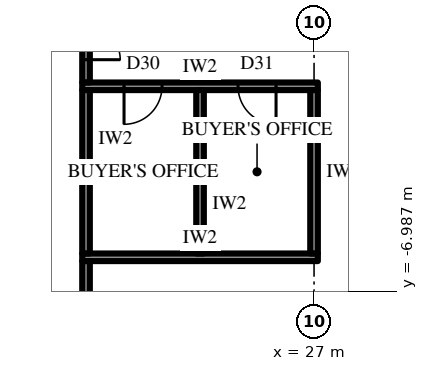
"""IFC4 building model, lengths in metres.
Left out: names, types, materials, properties, quantities, classifications, styles, units other than length and angle.
Written with IfcOpenShell. Run it as: python <this file> out.ifc"""

import sys

from ifc_helpers import new_model, si_unit, direction, frame, frame_2d, origin, place, context, subcontext, project, spatial, rectangle, extrude, element, fill, save


model = new_model("IFC4")
c1 = context("Model", 3, precision=1e-05, world=origin(), true_north=direction((0.0, 1.0)))
c2 = subcontext(c1, "Body", "Model", "MODEL_VIEW")
j1 = project(units=[si_unit("LENGTHUNIT", "METRE"), si_unit("PLANEANGLEUNIT", "RADIAN")], contexts=[c1])
p1 = place(None, origin())
s1 = spatial("IfcSite", under=j1, at=p1, CompositionType="ELEMENT")
p2 = place(p1, origin())
s2 = spatial("IfcBuilding", under=s1, at=p2, CompositionType="ELEMENT")
p3 = place(p2, frame((0.0, 0.0, 73.9)))
s3 = spatial("IfcBuildingStorey", under=s2, at=p3, CompositionType="ELEMENT", Elevation=73.9)
p4 = place(p3, frame((21.232, -30.925, 0.0), z_axis=(0.0, 0.0, 1.0), x_axis=(0.499999163675, 0.866025886636, 0.0)))
e1 = element("IfcWall", 1, at=p4, inside=s3, PredefinedType="SOLIDWALL", context=c2, shape_type="SweptSolid", body=[
    extrude(rectangle(XDim=32.332, YDim=0.3, at=frame_2d((16.166, 0.0))), origin(), (0.0, 0.0, 1.0), 2.7),
])
p5 = place(p4, frame((1.319, 0.0, 0.6)))
e2 = element("IfcOpeningElement", 2, at=p5, cuts=e1, PredefinedType="OPENING", context=c2, shape_type="SweptSolid", body=[
    extrude(rectangle(XDim=2.75, YDim=1.85, at=frame_2d((1.375, 0.925))), frame((0.0, 0.16, 0.0), z_axis=(0.0, -1.0, 0.0), x_axis=(1.0, 0.0, 0.0)), (0.0, 0.0, 1.0), 0.32),
])
p6 = place(p4, frame((6.708, 0.0, 0.6)))
e3 = element("IfcOpeningElement", 3, at=p6, cuts=e1, PredefinedType="OPENING", context=c2, shape_type="SweptSolid", body=[
    extrude(rectangle(XDim=2.75, YDim=1.85, at=frame_2d((1.375, 0.925))), frame((0.0, 0.16, 0.0), z_axis=(0.0, -1.0, 0.0), x_axis=(1.0, 0.0, 0.0)), (0.0, 0.0, 1.0), 0.32),
])
p7 = place(p4, frame((12.872, 0.0, 0.0)))
e4 = element("IfcOpeningElement", 4, at=p7, cuts=e1, PredefinedType="OPENING", context=c2, shape_type="SweptSolid", body=[
    extrude(rectangle(XDim=1.2, YDim=2.4, at=frame_2d((0.6, 1.2))), frame((0.0, 0.16, 0.0), z_axis=(0.0, -1.0, 0.0), x_axis=(1.0, 0.0, 0.0)), (0.0, 0.0, 1.0), 0.32),
])
p8 = place(p4, frame((17.485, 0.0, 0.6)))
e5 = element("IfcOpeningElement", 5, at=p8, cuts=e1, PredefinedType="OPENING", context=c2, shape_type="SweptSolid", body=[
    extrude(rectangle(XDim=2.75, YDim=1.85, at=frame_2d((1.375, 0.925))), frame((0.0, 0.16, 0.0), z_axis=(0.0, -1.0, 0.0), x_axis=(1.0, 0.0, 0.0)), (0.0, 0.0, 1.0), 0.32),
])
p9 = place(p4, frame((22.874, 0.0, 0.6)))
e6 = element("IfcOpeningElement", 6, at=p9, cuts=e1, PredefinedType="OPENING", context=c2, shape_type="SweptSolid", body=[
    extrude(rectangle(XDim=2.75, YDim=1.85, at=frame_2d((1.375, 0.925))), frame((0.0, 0.16, 0.0), z_axis=(0.0, -1.0, 0.0), x_axis=(1.0, 0.0, 0.0)), (0.0, 0.0, 1.0), 0.32),
])
p10 = place(p4, frame((28.262, 0.0, 0.6)))
e7 = element("IfcOpeningElement", 7, at=p10, cuts=e1, PredefinedType="OPENING", context=c2, shape_type="SweptSolid", body=[
    extrude(rectangle(XDim=2.75, YDim=1.85, at=frame_2d((1.375, 0.925))), frame((0.0, 0.16, 0.0), z_axis=(0.0, -1.0, 0.0), x_axis=(1.0, 0.0, 0.0)), (0.0, 0.0, 1.0), 0.32),
])
p11 = place(p3, frame((20.9, -1.6, 0.0), z_axis=(0.0, 0.0, 1.0), x_axis=(1.0, 0.0, 0.0)))
e8 = element("IfcWall", 8, at=p11, inside=s3, PredefinedType="PARTITIONING", context=c2, shape_type="SweptSolid", body=[
    extrude(rectangle(XDim=6.2, YDim=0.2, at=frame_2d((3.1, 0.0))), origin(), (0.0, 0.0, 1.0), 4.0),
])
p12 = place(p11, frame((1.1, 0.0, 0.0)))
e9 = element("IfcOpeningElement", 9, at=p12, cuts=e8, PredefinedType="OPENING", context=c2, shape_type="SweptSolid", body=[
    extrude(rectangle(XDim=1.0, YDim=2.2, at=frame_2d((0.5, 1.1))), frame((0.0, 0.11, 0.0), z_axis=(0.0, -1.0, 0.0), x_axis=(1.0, 0.0, 0.0)), (0.0, 0.0, 1.0), 0.22),
])
p13 = place(p11, frame((4.1, 0.0, 0.0)))
e10 = element("IfcOpeningElement", 10, at=p13, cuts=e8, PredefinedType="OPENING", context=c2, shape_type="SweptSolid", body=[
    extrude(rectangle(XDim=1.0, YDim=2.2, at=frame_2d((0.5, 1.1))), frame((0.0, 0.11, 0.0), z_axis=(0.0, -1.0, 0.0), x_axis=(1.0, 0.0, 0.0)), (0.0, 0.0, 1.0), 0.22),
])
p14 = place(p3, frame((20.9, -6.1, 0.0), z_axis=(0.0, 0.0, 1.0), x_axis=(1.0, 0.0, 0.0)))
e11 = element("IfcWall", 11, at=p14, inside=s3, PredefinedType="PARTITIONING", context=c2, shape_type="SweptSolid", body=[
    extrude(rectangle(XDim=6.2, YDim=0.2, at=frame_2d((3.1, 0.0))), origin(), (0.0, 0.0, 1.0), 4.0),
])
for number, where, z_axis, x_axis in (
    (12, (21.0, -1.7, 0.0), (0.0, 0.0, 1.0), (0.0, -1.0, 0.0)),
    (13, (24.0, -1.7, 0.0), (0.0, 0.0, 1.0), (0.0, -1.0, 0.0)),
    (14, (27.0, -1.7, 0.0), (0.0, 0.0, 1.0), (0.0, -1.0, 0.0)),
):
    element("IfcWall", number, at=place(p3, frame(where, z_axis=z_axis, x_axis=x_axis)), inside=s3, PredefinedType="PARTITIONING", context=c2, shape_type="SweptSolid", body=[
        extrude(rectangle(XDim=4.3, YDim=0.2, at=frame_2d((2.15, 0.0))), origin(), (0.0, 0.0, 1.0), 4.0),
    ])
p15 = place(p3, frame((21.0, -6.201, 0.0), z_axis=(0.0, 0.0, 1.0), x_axis=(0.0, -1.0, 0.0)))
e15 = element("IfcWall", 15, at=p15, inside=s3, PredefinedType="PARTITIONING", context=c2, shape_type="SweptSolid", body=[
    extrude(rectangle(XDim=6.499, YDim=0.2, at=frame_2d((3.25, 0.0))), origin(), (0.0, 0.0, 1.0), 4.0),
])
p16 = place(p3, frame((21.0, 1.499, 0.0), z_axis=(0.0, 0.0, 1.0), x_axis=(0.0, -1.0, 0.0)))
e16 = element("IfcWall", 16, at=p16, inside=s3, PredefinedType="PARTITIONING", context=c2, shape_type="SweptSolid", body=[
    extrude(rectangle(XDim=2.998, YDim=0.2, at=frame_2d((1.499, 0.0))), origin(), (0.0, 0.0, 1.0), 4.0),
])
p17 = place(p16, frame((0.599, 0.0, 0.0)))
e17 = element("IfcOpeningElement", 17, at=p17, cuts=e16, PredefinedType="OPENING", context=c2, shape_type="SweptSolid", body=[
    extrude(rectangle(XDim=1.8, YDim=2.4, at=frame_2d((0.9, 1.2))), frame((0.0, 0.11, 0.0), z_axis=(0.0, -1.0, 0.0), x_axis=(1.0, 0.0, 0.0)), (0.0, 0.0, 1.0), 0.22),
])
p18 = place(p12, frame((1.0, 0.0, 0.0), z_axis=(0.0, 0.0, 1.0), x_axis=(-1.0, 0.0, 0.0)))
e18 = element("IfcDoor", 18, at=p18, inside=s3, OperationType="SINGLE_SWING_LEFT", PredefinedType="DOOR", context=c2, shape_type="SweptSolid", body=[
    extrude(rectangle(XDim=1.0, YDim=2.2, at=frame_2d((0.5, 1.1))), frame((0.0, 0.025, 0.0), z_axis=(0.0, -1.0, 0.0), x_axis=(1.0, 0.0, 0.0)), (0.0, 0.0, 1.0), 0.05),
])
fill(e9, e18)
p19 = place(p13, frame((1.0, 0.0, 0.0), z_axis=(0.0, 0.0, 1.0), x_axis=(-1.0, 0.0, 0.0)))
e19 = element("IfcDoor", 19, at=p19, inside=s3, OperationType="SINGLE_SWING_RIGHT", PredefinedType="DOOR", context=c2, shape_type="SweptSolid", body=[
    extrude(rectangle(XDim=1.0, YDim=2.2, at=frame_2d((0.5, 1.1))), frame((0.0, 0.025, 0.0), z_axis=(0.0, -1.0, 0.0), x_axis=(1.0, 0.0, 0.0)), (0.0, 0.0, 1.0), 0.05),
])
fill(e10, e19)
p20 = place(p17, origin())
e20 = element("IfcDoor", 20, at=p20, inside=s3, OperationType="DOUBLE_DOOR_SINGLE_SWING", PredefinedType="DOOR", context=c2, shape_type="SweptSolid", body=[
    extrude(rectangle(XDim=1.8, YDim=2.4, at=frame_2d((0.9, 1.2))), frame((0.0, 0.025, 0.0), z_axis=(0.0, -1.0, 0.0), x_axis=(1.0, 0.0, 0.0)), (0.0, 0.0, 1.0), 0.05),
])
fill(e17, e20)
save(model, sys.argv[1])
